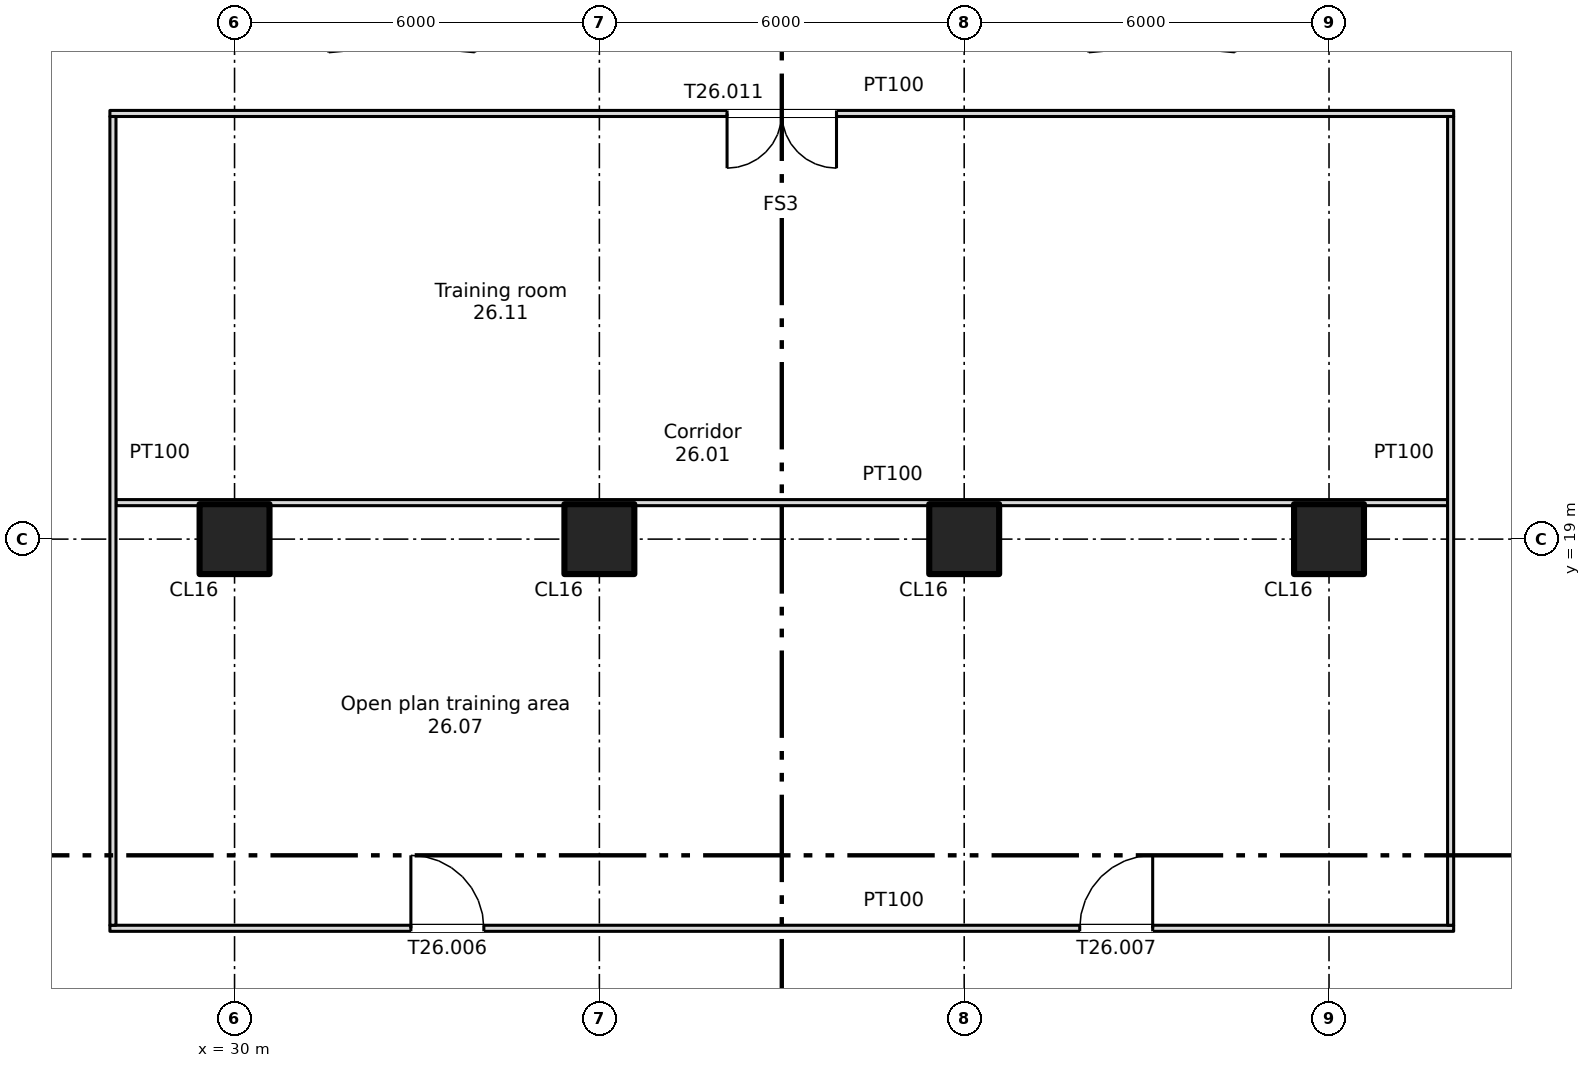
"""IFC4 building model, lengths in metres.
Left out: names, types, materials, properties, quantities, classifications, styles, units other than length and angle.
Written with IfcOpenShell. Run it as: python <this file> out.ifc"""

import sys

from ifc_helpers import new_model, si_unit, direction, frame, frame_2d, origin, origin_2d, place, context, subcontext, project, spatial, rectangle, extrude, element, fill, save


model = new_model("IFC4")
c1 = context("Model", 3, precision=1e-05, world=origin(), true_north=direction((0.0, 1.0)))
c2 = subcontext(c1, "Body", "Model", "MODEL_VIEW")
j1 = project(units=[si_unit("LENGTHUNIT", "METRE"), si_unit("PLANEANGLEUNIT", "RADIAN")], contexts=[c1])
p1 = place(None, origin())
s1 = spatial("IfcSite", under=j1, at=p1, CompositionType="ELEMENT")
p2 = place(p1, origin())
s2 = spatial("IfcBuilding", under=s1, at=p2, CompositionType="ELEMENT")
p3 = place(p2, frame((0.0, 0.0, 178.0)))
s3 = spatial("IfcBuildingStorey", under=s2, at=p3, CompositionType="ELEMENT", Elevation=178.0)
for number, where, z_axis, x_axis in (
    (1, (30.0, 19.0, 0.0), (0.0, 0.0, 1.0), (1.0, 0.0, 0.0)),
    (2, (36.0, 19.0, 0.0), (0.0, 0.0, 1.0), (1.0, 0.0, 0.0)),
    (3, (42.0, 19.0, 0.0), (0.0, 0.0, 1.0), (1.0, 0.0, 0.0)),
    (4, (48.0, 19.0, 0.0), (0.0, 0.0, 1.0), (1.0, 0.0, 0.0)),
):
    element("IfcColumn", number, at=place(p3, frame(where, z_axis=z_axis, x_axis=x_axis)), inside=s3, PredefinedType="COLUMN", context=c2, shape_type="SweptSolid", body=[
        extrude(rectangle(XDim=1.15, YDim=1.15, at=origin_2d()), origin(), (0.0, 0.0, 1.0), 3.35),
    ])
p4 = place(p3, frame((27.95, 12.6, 0.0), z_axis=(0.0, 0.0, 1.0), x_axis=(1.0, 0.0, 0.0)))
e5 = element("IfcWall", 5, at=p4, inside=s3, PredefinedType="PARTITIONING", context=c2, shape_type="SweptSolid", body=[
    extrude(rectangle(XDim=22.1, YDim=0.1, at=frame_2d((11.05, 0.0))), origin(), (0.0, 0.0, 1.0), 3.35),
])
p5 = place(p4, frame((4.95, 0.0, 0.0)))
e6 = element("IfcOpeningElement", 6, at=p5, cuts=e5, PredefinedType="OPENING", context=c2, shape_type="SweptSolid", body=[
    extrude(rectangle(XDim=1.2, YDim=2.1, at=frame_2d((0.6, 1.05))), frame((0.0, 0.06, 0.0), z_axis=(0.0, -1.0, 0.0), x_axis=(1.0, 0.0, 0.0)), (0.0, 0.0, 1.0), 0.12),
])
p6 = place(p4, frame((15.95, 0.0, 0.0)))
e7 = element("IfcOpeningElement", 7, at=p6, cuts=e5, PredefinedType="OPENING", context=c2, shape_type="SweptSolid", body=[
    extrude(rectangle(XDim=1.2, YDim=2.1, at=frame_2d((0.6, 1.05))), frame((0.0, 0.06, 0.0), z_axis=(0.0, -1.0, 0.0), x_axis=(1.0, 0.0, 0.0)), (0.0, 0.0, 1.0), 0.12),
])
p7 = place(p3, frame((28.05, 19.6, 0.0), z_axis=(0.0, 0.0, 1.0), x_axis=(1.0, 0.0, 0.0)))
e8 = element("IfcWall", 8, at=p7, inside=s3, PredefinedType="PARTITIONING", context=c2, shape_type="SweptSolid", body=[
    extrude(rectangle(XDim=21.9, YDim=0.1, at=frame_2d((10.95, 0.0))), origin(), (0.0, 0.0, 1.0), 3.35),
])
p8 = place(p3, frame((27.95, 26.0, 0.0), z_axis=(0.0, 0.0, 1.0), x_axis=(1.0, 0.0, 0.0)))
e9 = element("IfcWall", 9, at=p8, inside=s3, PredefinedType="PARTITIONING", context=c2, shape_type="SweptSolid", body=[
    extrude(rectangle(XDim=22.1, YDim=0.1, at=frame_2d((11.05, 0.0))), origin(), (0.0, 0.0, 1.0), 3.35),
])
p9 = place(p8, frame((10.15, 0.0, 0.0)))
e10 = element("IfcOpeningElement", 10, at=p9, cuts=e9, PredefinedType="OPENING", context=c2, shape_type="SweptSolid", body=[
    extrude(rectangle(XDim=1.8, YDim=2.1, at=frame_2d((0.9, 1.05))), frame((0.0, 0.06, 0.0), z_axis=(0.0, -1.0, 0.0), x_axis=(1.0, 0.0, 0.0)), (0.0, 0.0, 1.0), 0.12),
])
for number, where, z_axis, x_axis in (
    (11, (28.0, 12.65, 0.0), (0.0, 0.0, 1.0), (0.0, 1.0, 0.0)),
    (12, (50.0, 12.65, 0.0), (0.0, 0.0, 1.0), (0.0, 1.0, 0.0)),
):
    element("IfcWall", number, at=place(p3, frame(where, z_axis=z_axis, x_axis=x_axis)), inside=s3, PredefinedType="PARTITIONING", context=c2, shape_type="SweptSolid", body=[
        extrude(rectangle(XDim=13.3, YDim=0.1, at=frame_2d((6.65, 0.0))), origin(), (0.0, 0.0, 1.0), 3.35),
    ])
p10 = place(p5, origin())
e13 = element("IfcDoor", 13, at=p10, inside=s3, OperationType="SINGLE_SWING_LEFT", PredefinedType="DOOR", context=c2, shape_type="SweptSolid", body=[
    extrude(rectangle(XDim=1.2, YDim=2.1, at=frame_2d((0.6, 1.05))), frame((0.0, 0.025, 0.0), z_axis=(0.0, -1.0, 0.0), x_axis=(1.0, 0.0, 0.0)), (0.0, 0.0, 1.0), 0.05),
])
fill(e6, e13)
p11 = place(p6, origin())
e14 = element("IfcDoor", 14, at=p11, inside=s3, OperationType="SINGLE_SWING_RIGHT", PredefinedType="DOOR", context=c2, shape_type="SweptSolid", body=[
    extrude(rectangle(XDim=1.2, YDim=2.1, at=frame_2d((0.6, 1.05))), frame((0.0, 0.025, 0.0), z_axis=(0.0, -1.0, 0.0), x_axis=(1.0, 0.0, 0.0)), (0.0, 0.0, 1.0), 0.05),
])
fill(e7, e14)
p12 = place(p9, origin())
e15 = element("IfcDoor", 15, at=p12, inside=s3, OperationType="DOUBLE_DOOR_SINGLE_SWING", PredefinedType="DOOR", context=c2, shape_type="SweptSolid", body=[
    extrude(rectangle(XDim=1.8, YDim=2.1, at=frame_2d((0.9, 1.05))), frame((0.0, 0.025, 0.0), z_axis=(0.0, -1.0, 0.0), x_axis=(1.0, 0.0, 0.0)), (0.0, 0.0, 1.0), 0.05),
])
fill(e10, e15)
save(model, sys.argv[1])
